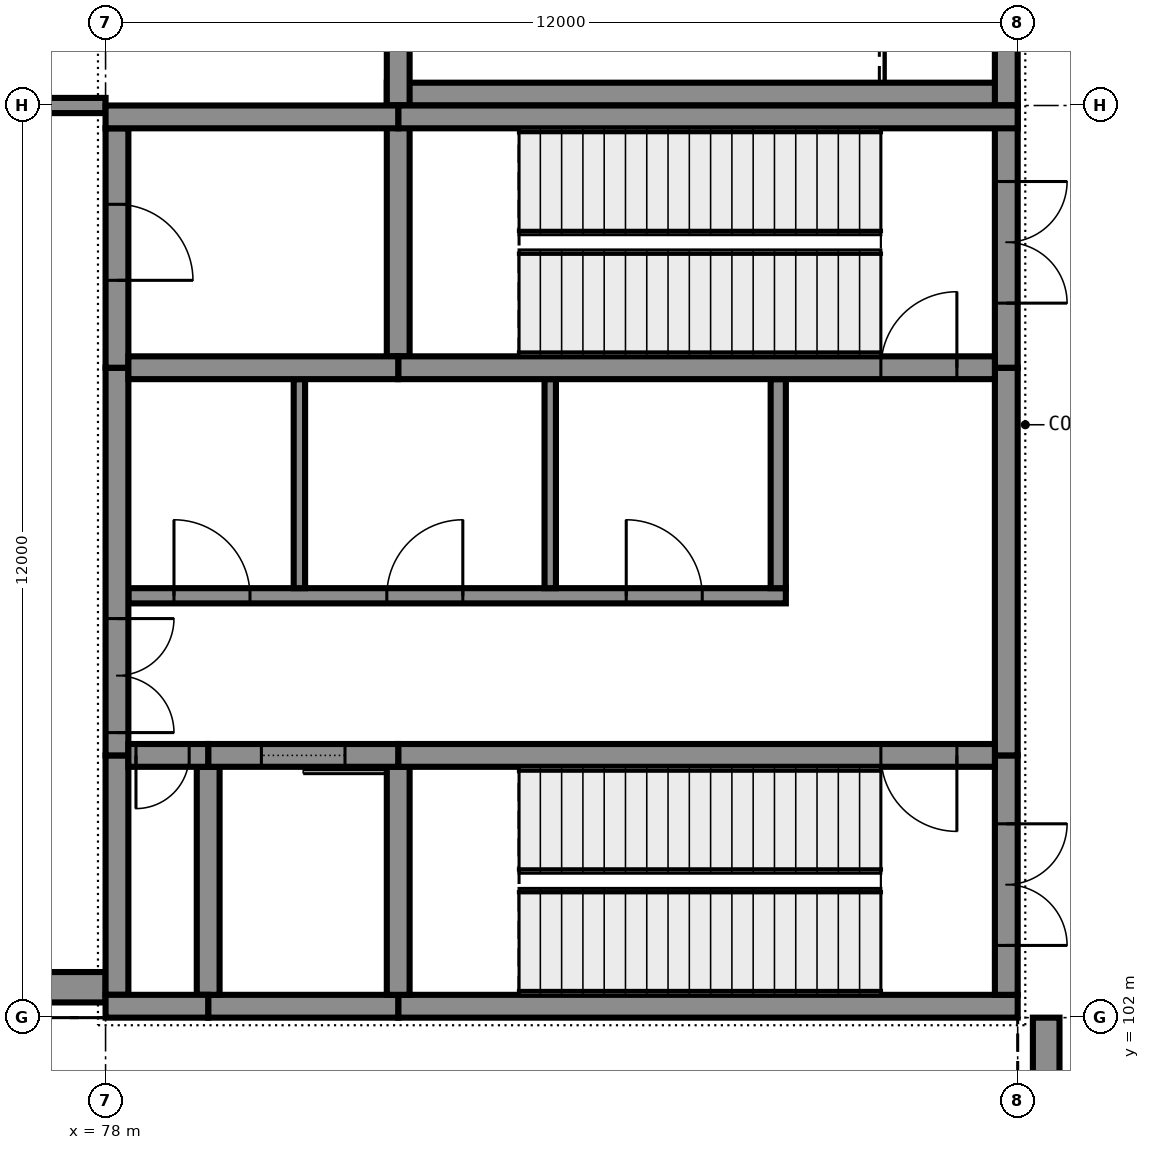
"""IFC4 building model, lengths in metres.
Left out: names, types, materials, properties, quantities, classifications, styles, units other than length and angle.
Written with IfcOpenShell. Run it as: python <this file> out.ifc"""

import sys

from ifc_helpers import new_model, si_unit, direction, frame, frame_2d, origin, place, context, subcontext, project, spatial, rectangle, extrude, element, fill, save


model = new_model("IFC4")
c1 = context("Model", 3, precision=1e-05, world=origin(), true_north=direction((0.0, 1.0)))
c2 = subcontext(c1, "Body", "Model", "MODEL_VIEW")
j1 = project(units=[si_unit("LENGTHUNIT", "METRE"), si_unit("PLANEANGLEUNIT", "RADIAN")], contexts=[c1])
p1 = place(None, origin())
s1 = spatial("IfcSite", under=j1, at=p1, CompositionType="ELEMENT")
p2 = place(p1, origin())
s2 = spatial("IfcBuilding", under=s1, at=p2, CompositionType="ELEMENT")
p3 = place(p2, origin())
s3 = spatial("IfcBuildingStorey", under=s2, at=p3, CompositionType="ELEMENT", Elevation=0.0)
p4 = place(p3, frame((90.0, 114.15, 0.0), z_axis=(0.0, 0.0, 1.0), x_axis=(-1.0, 0.0, 0.0)))
e1 = element("IfcWall", 1, at=p4, inside=s3, PredefinedType="SHEAR", context=c2, shape_type="SweptSolid", body=[
    extrude(rectangle(XDim=8.3, YDim=0.3, at=frame_2d((4.15, 0.0))), origin(), (0.0, 0.0, 1.0), 5.75),
])
p5 = place(p3, frame((89.85, 114.0, 0.0), z_axis=(0.0, 0.0, 1.0), x_axis=(0.0, 1.0, 0.0)))
e2 = element("IfcWall", 2, at=p5, inside=s3, PredefinedType="SHEAR", context=c2, shape_type="SweptSolid", body=[
    extrude(rectangle(XDim=3.3, YDim=0.3, at=frame_2d((1.65, 0.0))), origin(), (0.0, 0.0, 1.0), 5.75),
])
p6 = place(p5, frame((1.0, 0.0, 0.0)))
e3 = element("IfcOpeningElement", 3, at=p6, cuts=e2, PredefinedType="OPENING", context=c2, shape_type="SweptSolid", body=[
    extrude(rectangle(XDim=1.6, YDim=2.1, at=frame_2d((0.8, 1.05))), frame((0.0, 0.16, 0.0), z_axis=(0.0, -1.0, 0.0), x_axis=(1.0, 0.0, 0.0)), (0.0, 0.0, 1.0), 0.32),
])
p7 = place(p3, frame((81.85, 114.0, 0.0), z_axis=(0.0, 0.0, 1.0), x_axis=(0.0, 1.0, 0.0)))
e4 = element("IfcWall", 4, at=p7, inside=s3, PredefinedType="SHEAR", context=c2, shape_type="SweptSolid", body=[
    extrude(rectangle(XDim=3.3, YDim=0.3, at=frame_2d((1.65, 0.0))), origin(), (0.0, 0.0, 1.0), 5.75),
])
p8 = place(p3, frame((90.0, 102.15, 0.0), z_axis=(0.0, 0.0, 1.0), x_axis=(-1.0, 0.0, 0.0)))
e5 = element("IfcWall", 5, at=p8, inside=s3, PredefinedType="SHEAR", context=c2, shape_type="SweptSolid", body=[
    extrude(rectangle(XDim=8.15, YDim=0.3, at=frame_2d((4.075, 0.0))), origin(), (0.0, 0.0, 1.0), 5.75),
])
p9 = place(p3, frame((81.85, 102.15, 0.0), z_axis=(0.0, 0.0, 1.0), x_axis=(-1.0, 0.0, 0.0)))
e6 = element("IfcWall", 6, at=p9, inside=s3, PredefinedType="SHEAR", context=c2, shape_type="SweptSolid", body=[
    extrude(rectangle(XDim=2.5, YDim=0.3, at=frame_2d((1.25, 0.0))), origin(), (0.0, 0.0, 1.0), 5.75),
])
p10 = place(p3, frame((79.35, 102.15, 0.0), z_axis=(0.0, 0.0, 1.0), x_axis=(-1.0, 0.0, 0.0)))
e7 = element("IfcWall", 7, at=p10, inside=s3, PredefinedType="SHEAR", context=c2, shape_type="SweptSolid", body=[
    extrude(rectangle(XDim=1.35, YDim=0.3, at=frame_2d((0.675, 0.0))), origin(), (0.0, 0.0, 1.0), 5.75),
])
p11 = place(p3, frame((90.0, 113.85, 0.0), z_axis=(0.0, 0.0, 1.0), x_axis=(-1.0, 0.0, 0.0)))
e8 = element("IfcWall", 8, at=p11, inside=s3, PredefinedType="SHEAR", context=c2, shape_type="SweptSolid", body=[
    extrude(rectangle(XDim=8.15, YDim=0.3, at=frame_2d((4.075, 0.0))), origin(), (0.0, 0.0, 1.0), 5.75),
])
p12 = place(p3, frame((81.85, 113.85, 0.0), z_axis=(0.0, 0.0, 1.0), x_axis=(-1.0, 0.0, 0.0)))
e9 = element("IfcWall", 9, at=p12, inside=s3, PredefinedType="SHEAR", context=c2, shape_type="SweptSolid", body=[
    extrude(rectangle(XDim=3.85, YDim=0.3, at=frame_2d((1.925, 0.0))), origin(), (0.0, 0.0, 1.0), 5.75),
])
p13 = place(p3, frame((89.7, 105.45, 0.0), z_axis=(0.0, 0.0, 1.0), x_axis=(-1.0, 0.0, 0.0)))
e10 = element("IfcWall", 10, at=p13, inside=s3, PredefinedType="SHEAR", context=c2, shape_type="SweptSolid", body=[
    extrude(rectangle(XDim=7.85, YDim=0.3, at=frame_2d((3.925, 0.0))), origin(), (0.0, 0.0, 1.0), 5.75),
])
p14 = place(p13, frame((0.5, 0.0, 0.0)))
e11 = element("IfcOpeningElement", 11, at=p14, cuts=e10, PredefinedType="OPENING", context=c2, shape_type="SweptSolid", body=[
    extrude(rectangle(XDim=1.0, YDim=2.1, at=frame_2d((0.5, 1.05))), frame((0.0, 0.16, 0.0), z_axis=(0.0, -1.0, 0.0), x_axis=(1.0, 0.0, 0.0)), (0.0, 0.0, 1.0), 0.32),
])
p15 = place(p3, frame((81.85, 105.45, 0.0), z_axis=(0.0, 0.0, 1.0), x_axis=(-1.0, 0.0, 0.0)))
e12 = element("IfcWall", 12, at=p15, inside=s3, PredefinedType="SHEAR", context=c2, shape_type="SweptSolid", body=[
    extrude(rectangle(XDim=2.5, YDim=0.3, at=frame_2d((1.25, 0.0))), origin(), (0.0, 0.0, 1.0), 5.75),
])
p16 = place(p15, frame((0.7, 0.0, 0.0)))
e13 = element("IfcOpeningElement", 13, at=p16, cuts=e12, PredefinedType="OPENING", context=c2, shape_type="SweptSolid", body=[
    extrude(rectangle(XDim=1.1, YDim=2.1, at=frame_2d((0.55, 1.05))), frame((0.0, 0.16, 0.0), z_axis=(0.0, -1.0, 0.0), x_axis=(1.0, 0.0, 0.0)), (0.0, 0.0, 1.0), 0.32),
])
p17 = place(p3, frame((79.35, 105.45, 0.0), z_axis=(0.0, 0.0, 1.0), x_axis=(-1.0, 0.0, 0.0)))
e14 = element("IfcWall", 14, at=p17, inside=s3, PredefinedType="SHEAR", context=c2, shape_type="SweptSolid", body=[
    extrude(rectangle(XDim=1.05, YDim=0.3, at=frame_2d((0.525, 0.0))), origin(), (0.0, 0.0, 1.0), 5.75),
])
p18 = place(p17, frame((0.25, 0.0, 0.0)))
e15 = element("IfcOpeningElement", 15, at=p18, cuts=e14, PredefinedType="OPENING", context=c2, shape_type="SweptSolid", body=[
    extrude(rectangle(XDim=0.7, YDim=2.1, at=frame_2d((0.35, 1.05))), frame((0.0, 0.16, 0.0), z_axis=(0.0, -1.0, 0.0), x_axis=(1.0, 0.0, 0.0)), (0.0, 0.0, 1.0), 0.32),
])
p19 = place(p3, frame((89.7, 110.55, 0.0), z_axis=(0.0, 0.0, 1.0), x_axis=(-1.0, 0.0, 0.0)))
e16 = element("IfcWall", 16, at=p19, inside=s3, PredefinedType="SHEAR", context=c2, shape_type="SweptSolid", body=[
    extrude(rectangle(XDim=7.85, YDim=0.3, at=frame_2d((3.925, 0.0))), origin(), (0.0, 0.0, 1.0), 5.75),
])
p20 = place(p19, frame((0.5, 0.0, 0.0)))
e17 = element("IfcOpeningElement", 17, at=p20, cuts=e16, PredefinedType="OPENING", context=c2, shape_type="SweptSolid", body=[
    extrude(rectangle(XDim=1.0, YDim=2.1, at=frame_2d((0.5, 1.05))), frame((0.0, 0.16, 0.0), z_axis=(0.0, -1.0, 0.0), x_axis=(1.0, 0.0, 0.0)), (0.0, 0.0, 1.0), 0.32),
])
p21 = place(p3, frame((81.85, 110.55, 0.0), z_axis=(0.0, 0.0, 1.0), x_axis=(-1.0, 0.0, 0.0)))
e18 = element("IfcWall", 18, at=p21, inside=s3, PredefinedType="SHEAR", context=c2, shape_type="SweptSolid", body=[
    extrude(rectangle(XDim=3.55, YDim=0.3, at=frame_2d((1.775, 0.0))), origin(), (0.0, 0.0, 1.0), 5.75),
])
p22 = place(p3, frame((89.85, 102.3, 0.0), z_axis=(0.0, 0.0, 1.0), x_axis=(0.0, 1.0, 0.0)))
e19 = element("IfcWall", 19, at=p22, inside=s3, PredefinedType="SHEAR", context=c2, shape_type="SweptSolid", body=[
    extrude(rectangle(XDim=3.15, YDim=0.3, at=frame_2d((1.575, 0.0))), origin(), (0.0, 0.0, 1.0), 5.75),
])
p23 = place(p22, frame((0.65, 0.0, 0.0)))
e20 = element("IfcOpeningElement", 20, at=p23, cuts=e19, PredefinedType="OPENING", context=c2, shape_type="SweptSolid", body=[
    extrude(rectangle(XDim=1.6, YDim=2.1, at=frame_2d((0.8, 1.05))), frame((0.0, 0.16, 0.0), z_axis=(0.0, -1.0, 0.0), x_axis=(1.0, 0.0, 0.0)), (0.0, 0.0, 1.0), 0.32),
])
p24 = place(p3, frame((89.85, 105.45, 0.0), z_axis=(0.0, 0.0, 1.0), x_axis=(0.0, 1.0, 0.0)))
e21 = element("IfcWall", 21, at=p24, inside=s3, PredefinedType="SHEAR", context=c2, shape_type="SweptSolid", body=[
    extrude(rectangle(XDim=5.1, YDim=0.3, at=frame_2d((2.55, 0.0))), origin(), (0.0, 0.0, 1.0), 5.75),
])
p25 = place(p3, frame((89.85, 110.55, 0.0), z_axis=(0.0, 0.0, 1.0), x_axis=(0.0, 1.0, 0.0)))
e22 = element("IfcWall", 22, at=p25, inside=s3, PredefinedType="SHEAR", context=c2, shape_type="SweptSolid", body=[
    extrude(rectangle(XDim=3.45, YDim=0.3, at=frame_2d((1.725, 0.0))), origin(), (0.0, 0.0, 1.0), 5.75),
])
p26 = place(p25, frame((0.85, 0.0, 0.0)))
e23 = element("IfcOpeningElement", 23, at=p26, cuts=e22, PredefinedType="OPENING", context=c2, shape_type="SweptSolid", body=[
    extrude(rectangle(XDim=1.6, YDim=2.1, at=frame_2d((0.8, 1.05))), frame((0.0, 0.16, 0.0), z_axis=(0.0, -1.0, 0.0), x_axis=(1.0, 0.0, 0.0)), (0.0, 0.0, 1.0), 0.32),
])
p27 = place(p3, frame((78.15, 102.3, 0.0), z_axis=(0.0, 0.0, 1.0), x_axis=(0.0, 1.0, 0.0)))
e24 = element("IfcWall", 24, at=p27, inside=s3, PredefinedType="SHEAR", context=c2, shape_type="SweptSolid", body=[
    extrude(rectangle(XDim=3.15, YDim=0.3, at=frame_2d((1.575, 0.0))), origin(), (0.0, 0.0, 1.0), 5.75),
])
p28 = place(p3, frame((78.15, 105.45, 0.0), z_axis=(0.0, 0.0, 1.0), x_axis=(0.0, 1.0, 0.0)))
e25 = element("IfcWall", 25, at=p28, inside=s3, PredefinedType="SHEAR", context=c2, shape_type="SweptSolid", body=[
    extrude(rectangle(XDim=5.1, YDim=0.3, at=frame_2d((2.55, 0.0))), origin(), (0.0, 0.0, 1.0), 5.75),
])
p29 = place(p28, frame((0.3, 0.0, 0.0)))
e26 = element("IfcOpeningElement", 26, at=p29, cuts=e25, PredefinedType="OPENING", context=c2, shape_type="SweptSolid", body=[
    extrude(rectangle(XDim=1.5, YDim=2.1, at=frame_2d((0.75, 1.05))), frame((0.0, 0.16, 0.0), z_axis=(0.0, -1.0, 0.0), x_axis=(1.0, 0.0, 0.0)), (0.0, 0.0, 1.0), 0.32),
])
p30 = place(p3, frame((78.15, 110.55, 0.0), z_axis=(0.0, 0.0, 1.0), x_axis=(0.0, 1.0, 0.0)))
e27 = element("IfcWall", 27, at=p30, inside=s3, PredefinedType="SHEAR", context=c2, shape_type="SweptSolid", body=[
    extrude(rectangle(XDim=3.15, YDim=0.3, at=frame_2d((1.575, 0.0))), origin(), (0.0, 0.0, 1.0), 5.75),
])
p31 = place(p30, frame((1.15, 0.0, 0.0)))
e28 = element("IfcOpeningElement", 28, at=p31, cuts=e27, PredefinedType="OPENING", context=c2, shape_type="SweptSolid", body=[
    extrude(rectangle(XDim=1.0, YDim=2.1, at=frame_2d((0.5, 1.05))), frame((0.0, 0.16, 0.0), z_axis=(0.0, -1.0, 0.0), x_axis=(1.0, 0.0, 0.0)), (0.0, 0.0, 1.0), 0.32),
])
p32 = place(p3, frame((81.85, 102.3, 0.0), z_axis=(0.0, 0.0, 1.0), x_axis=(0.0, 1.0, 0.0)))
e29 = element("IfcWall", 29, at=p32, inside=s3, PredefinedType="SHEAR", context=c2, shape_type="SweptSolid", body=[
    extrude(rectangle(XDim=3.0, YDim=0.3, at=frame_2d((1.5, 0.0))), origin(), (0.0, 0.0, 1.0), 5.75),
])
p33 = place(p3, frame((81.85, 110.7, 0.0), z_axis=(0.0, 0.0, 1.0), x_axis=(0.0, 1.0, 0.0)))
e30 = element("IfcWall", 30, at=p33, inside=s3, PredefinedType="SHEAR", context=c2, shape_type="SweptSolid", body=[
    extrude(rectangle(XDim=3.3, YDim=0.3, at=frame_2d((1.65, 0.0))), origin(), (0.0, 0.0, 1.0), 5.75),
])
p34 = place(p3, frame((79.35, 102.3, 0.0), z_axis=(0.0, 0.0, 1.0), x_axis=(0.0, 1.0, 0.0)))
e31 = element("IfcWall", 31, at=p34, inside=s3, PredefinedType="SHEAR", context=c2, shape_type="SweptSolid", body=[
    extrude(rectangle(XDim=3.0, YDim=0.3, at=frame_2d((1.5, 0.0))), origin(), (0.0, 0.0, 1.0), 5.75),
])
p35 = place(p3, frame((90.375, 90.5, 0.0), z_axis=(0.0, 0.0, 1.0), x_axis=(0.0, 1.0, 0.0)))
e32 = element("IfcWall", 32, at=p35, inside=s3, PredefinedType="STANDARD", context=c2, shape_type="SweptSolid", body=[
    extrude(rectangle(XDim=11.5, YDim=0.35, at=frame_2d((5.75, 0.0))), origin(), (0.0, 0.0, 1.0), 6.0),
])
p36 = place(p35, frame((3.1, 0.0, 0.0)))
e33 = element("IfcOpeningElement", 33, at=p36, cuts=e32, PredefinedType="OPENING", context=c2, shape_type="SweptSolid", body=[
    extrude(rectangle(XDim=4.8, YDim=2.4, at=frame_2d((2.4, 1.2))), frame((0.0, 0.185, 0.0), z_axis=(0.0, -1.0, 0.0), x_axis=(1.0, 0.0, 0.0)), (0.0, 0.0, 1.0), 0.37),
])
p37 = place(p3, frame((66.5, 102.4, 0.0), z_axis=(0.0, 0.0, 1.0), x_axis=(1.0, 0.0, 0.0)))
e34 = element("IfcWall", 34, at=p37, inside=s3, PredefinedType="SOLIDWALL", context=c2, shape_type="SweptSolid", body=[
    extrude(rectangle(XDim=11.5, YDim=0.4, at=frame_2d((5.75, 0.0))), origin(), (0.0, 0.0, 1.0), 6.0),
])
p38 = place(p37, frame((4.3, 0.0, 0.0)))
e35 = element("IfcOpeningElement", 35, at=p38, cuts=e34, PredefinedType="OPENING", context=c2, shape_type="SweptSolid", body=[
    extrude(rectangle(XDim=2.4, YDim=2.4, at=frame_2d((1.2, 1.2))), frame((0.0, 0.21, 0.0), z_axis=(0.0, -1.0, 0.0), x_axis=(1.0, 0.0, 0.0)), (0.0, 0.0, 1.0), 0.42),
])
p39 = place(p3, frame((78.3, 107.55, 0.0), z_axis=(0.0, 0.0, 1.0), x_axis=(1.0, 0.0, 0.0)))
e36 = element("IfcWall", 36, at=p39, inside=s3, PredefinedType="PARTITIONING", context=c2, shape_type="SweptSolid", body=[
    extrude(rectangle(XDim=8.65, YDim=0.2, at=frame_2d((4.325, 0.0))), origin(), (0.0, 0.0, 1.0), 5.75),
])
p40 = place(p39, frame((0.6, 0.0, 0.0)))
e37 = element("IfcOpeningElement", 37, at=p40, cuts=e36, PredefinedType="OPENING", context=c2, shape_type="SweptSolid", body=[
    extrude(rectangle(XDim=1.0, YDim=2.1, at=frame_2d((0.5, 1.05))), frame((0.0, 0.11, 0.0), z_axis=(0.0, -1.0, 0.0), x_axis=(1.0, 0.0, 0.0)), (0.0, 0.0, 1.0), 0.22),
])
p41 = place(p39, frame((3.4, 0.0, 0.0)))
e38 = element("IfcOpeningElement", 38, at=p41, cuts=e36, PredefinedType="OPENING", context=c2, shape_type="SweptSolid", body=[
    extrude(rectangle(XDim=1.0, YDim=2.1, at=frame_2d((0.5, 1.05))), frame((0.0, 0.11, 0.0), z_axis=(0.0, -1.0, 0.0), x_axis=(1.0, 0.0, 0.0)), (0.0, 0.0, 1.0), 0.22),
])
p42 = place(p39, frame((6.55, 0.0, 0.0)))
e39 = element("IfcOpeningElement", 39, at=p42, cuts=e36, PredefinedType="OPENING", context=c2, shape_type="SweptSolid", body=[
    extrude(rectangle(XDim=1.0, YDim=2.1, at=frame_2d((0.5, 1.05))), frame((0.0, 0.11, 0.0), z_axis=(0.0, -1.0, 0.0), x_axis=(1.0, 0.0, 0.0)), (0.0, 0.0, 1.0), 0.22),
])
p43 = place(p3, frame((29.9, 114.0, 0.0), z_axis=(0.0, 0.0, 1.0), x_axis=(1.0, 0.0, 0.0)))
e40 = element("IfcWall", 40, at=p43, inside=s3, PredefinedType="PARTITIONING", context=c2, shape_type="SweptSolid", body=[
    extrude(rectangle(XDim=48.1, YDim=0.2, at=frame_2d((24.05, 0.0))), origin(), (0.0, 0.0, 1.0), 4.75),
])
for number, where, z_axis, x_axis in (
    (41, (80.55, 107.65, 0.0), (0.0, 0.0, 1.0), (0.0, 1.0, 0.0)),
    (42, (83.85, 107.65, 0.0), (0.0, 0.0, 1.0), (0.0, 1.0, 0.0)),
):
    element("IfcWall", number, at=place(p3, frame(where, z_axis=z_axis, x_axis=x_axis)), inside=s3, PredefinedType="PARTITIONING", context=c2, shape_type="SweptSolid", body=[
        extrude(rectangle(XDim=2.75, YDim=0.15, at=frame_2d((1.375, 0.0))), origin(), (0.0, 0.0, 1.0), 5.75),
    ])
p44 = place(p3, frame((86.85, 107.65, 0.0), z_axis=(0.0, 0.0, 1.0), x_axis=(0.0, 1.0, 0.0)))
e43 = element("IfcWall", 43, at=p44, inside=s3, PredefinedType="PARTITIONING", context=c2, shape_type="SweptSolid", body=[
    extrude(rectangle(XDim=2.75, YDim=0.2, at=frame_2d((1.375, 0.0))), origin(), (0.0, 0.0, 1.0), 5.75),
])
p45 = place(p23, frame((1.6, 0.0, 0.0), z_axis=(0.0, 0.0, 1.0), x_axis=(-1.0, 0.0, 0.0)))
e44 = element("IfcDoor", 44, at=p45, inside=s3, OperationType="DOUBLE_DOOR_SINGLE_SWING", PredefinedType="DOOR", context=c2, shape_type="SweptSolid", body=[
    extrude(rectangle(XDim=1.6, YDim=2.1, at=frame_2d((0.8, 1.05))), frame((0.0, 0.025, 0.0), z_axis=(0.0, -1.0, 0.0), x_axis=(1.0, 0.0, 0.0)), (0.0, 0.0, 1.0), 0.05),
])
fill(e20, e44)
p46 = place(p18, origin())
e45 = element("IfcDoor", 45, at=p46, inside=s3, OperationType="SINGLE_SWING_LEFT", PredefinedType="DOOR", context=c2, shape_type="SweptSolid", body=[
    extrude(rectangle(XDim=0.7, YDim=2.1, at=frame_2d((0.35, 1.05))), frame((0.0, 0.025, 0.0), z_axis=(0.0, -1.0, 0.0), x_axis=(1.0, 0.0, 0.0)), (0.0, 0.0, 1.0), 0.05),
])
fill(e15, e45)
p47 = place(p16, origin())
e46 = element("IfcDoor", 46, at=p47, inside=s3, OperationType="SLIDING_TO_LEFT", PredefinedType="DOOR", context=c2, shape_type="SweptSolid", body=[
    extrude(rectangle(XDim=1.1, YDim=2.1, at=frame_2d((0.55, 1.05))), frame((0.0, 0.025, 0.0), z_axis=(0.0, -1.0, 0.0), x_axis=(1.0, 0.0, 0.0)), (0.0, 0.0, 1.0), 0.05),
])
fill(e13, e46)
p48 = place(p14, origin())
e47 = element("IfcDoor", 47, at=p48, inside=s3, OperationType="SINGLE_SWING_RIGHT", PredefinedType="DOOR", context=c2, shape_type="SweptSolid", body=[
    extrude(rectangle(XDim=1.0, YDim=2.1, at=frame_2d((0.5, 1.05))), frame((0.0, 0.025, 0.0), z_axis=(0.0, -1.0, 0.0), x_axis=(1.0, 0.0, 0.0)), (0.0, 0.0, 1.0), 0.05),
])
fill(e11, e47)
p49 = place(p29, frame((1.5, 0.0, 0.0), z_axis=(0.0, 0.0, 1.0), x_axis=(-1.0, 0.0, 0.0)))
e48 = element("IfcDoor", 48, at=p49, inside=s3, OperationType="DOUBLE_DOOR_SINGLE_SWING", PredefinedType="DOOR", context=c2, shape_type="SweptSolid", body=[
    extrude(rectangle(XDim=1.5, YDim=2.1, at=frame_2d((0.75, 1.05))), frame((0.0, 0.025, 0.0), z_axis=(0.0, -1.0, 0.0), x_axis=(1.0, 0.0, 0.0)), (0.0, 0.0, 1.0), 0.05),
])
fill(e26, e48)
p50 = place(p40, origin())
e49 = element("IfcDoor", 49, at=p50, inside=s3, OperationType="SINGLE_SWING_RIGHT", PredefinedType="DOOR", context=c2, shape_type="SweptSolid", body=[
    extrude(rectangle(XDim=1.0, YDim=2.1, at=frame_2d((0.5, 1.05))), frame((0.0, 0.025, 0.0), z_axis=(0.0, -1.0, 0.0), x_axis=(1.0, 0.0, 0.0)), (0.0, 0.0, 1.0), 0.05),
])
fill(e37, e49)
p51 = place(p41, origin())
e50 = element("IfcDoor", 50, at=p51, inside=s3, OperationType="SINGLE_SWING_LEFT", PredefinedType="DOOR", context=c2, shape_type="SweptSolid", body=[
    extrude(rectangle(XDim=1.0, YDim=2.1, at=frame_2d((0.5, 1.05))), frame((0.0, 0.025, 0.0), z_axis=(0.0, -1.0, 0.0), x_axis=(1.0, 0.0, 0.0)), (0.0, 0.0, 1.0), 0.05),
])
fill(e38, e50)
p52 = place(p42, origin())
e51 = element("IfcDoor", 51, at=p52, inside=s3, OperationType="SINGLE_SWING_RIGHT", PredefinedType="DOOR", context=c2, shape_type="SweptSolid", body=[
    extrude(rectangle(XDim=1.0, YDim=2.1, at=frame_2d((0.5, 1.05))), frame((0.0, 0.025, 0.0), z_axis=(0.0, -1.0, 0.0), x_axis=(1.0, 0.0, 0.0)), (0.0, 0.0, 1.0), 0.05),
])
fill(e39, e51)
p53 = place(p20, frame((1.0, 0.0, 0.0), z_axis=(0.0, 0.0, 1.0), x_axis=(-1.0, 0.0, 0.0)))
e52 = element("IfcDoor", 52, at=p53, inside=s3, OperationType="SINGLE_SWING_LEFT", PredefinedType="DOOR", context=c2, shape_type="SweptSolid", body=[
    extrude(rectangle(XDim=1.0, YDim=2.1, at=frame_2d((0.5, 1.05))), frame((0.0, 0.025, 0.0), z_axis=(0.0, -1.0, 0.0), x_axis=(1.0, 0.0, 0.0)), (0.0, 0.0, 1.0), 0.05),
])
fill(e17, e52)
p54 = place(p31, frame((1.0, 0.0, 0.0), z_axis=(0.0, 0.0, 1.0), x_axis=(-1.0, 0.0, 0.0)))
e53 = element("IfcDoor", 53, at=p54, inside=s3, OperationType="SINGLE_SWING_LEFT", PredefinedType="DOOR", context=c2, shape_type="SweptSolid", body=[
    extrude(rectangle(XDim=1.0, YDim=2.1, at=frame_2d((0.5, 1.05))), frame((0.0, 0.025, 0.0), z_axis=(0.0, -1.0, 0.0), x_axis=(1.0, 0.0, 0.0)), (0.0, 0.0, 1.0), 0.05),
])
fill(e28, e53)
p55 = place(p26, frame((1.6, 0.0, 0.0), z_axis=(0.0, 0.0, 1.0), x_axis=(-1.0, 0.0, 0.0)))
e54 = element("IfcDoor", 54, at=p55, inside=s3, OperationType="DOUBLE_DOOR_SINGLE_SWING", PredefinedType="DOOR", context=c2, shape_type="SweptSolid", body=[
    extrude(rectangle(XDim=1.6, YDim=2.1, at=frame_2d((0.8, 1.05))), frame((0.0, 0.025, 0.0), z_axis=(0.0, -1.0, 0.0), x_axis=(1.0, 0.0, 0.0)), (0.0, 0.0, 1.0), 0.05),
])
fill(e23, e54)
save(model, sys.argv[1])
